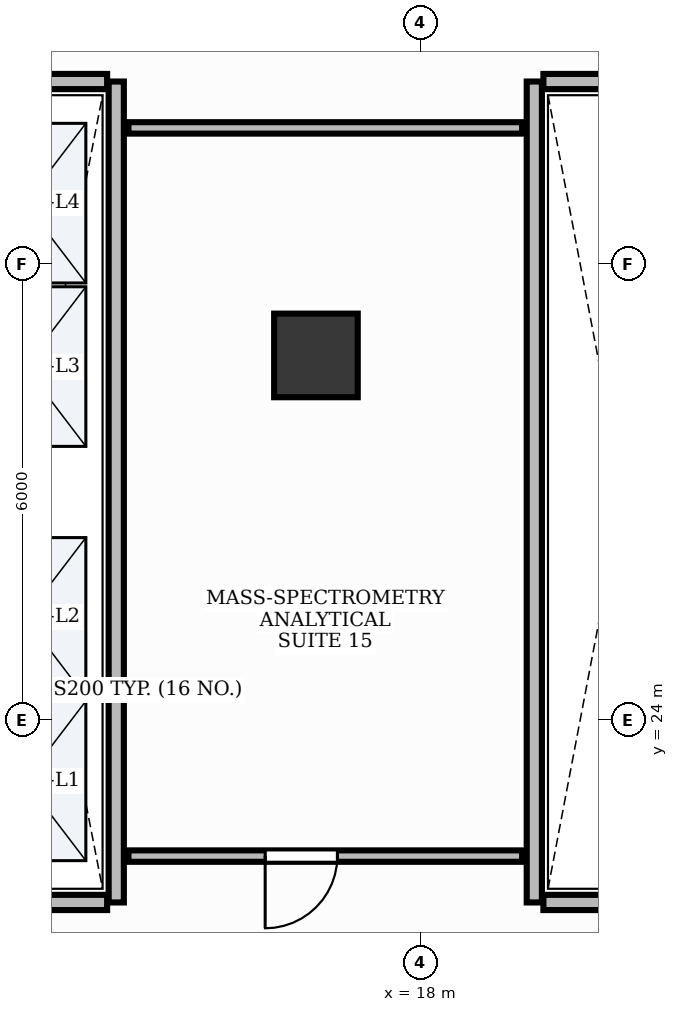
"""IFC4 building model, lengths in metres.
Left out: names, types, materials, properties, quantities, classifications, styles, units other than length and angle.
Written with IfcOpenShell. Run it as: python <this file> out.ifc"""

import sys

from ifc_helpers import new_model, si_unit, direction, frame, frame_2d, origin, origin_2d, place, context, subcontext, project, spatial, rectangle, extrude, element, fill, save


model = new_model("IFC4")
c1 = context("Model", 3, precision=1e-05, world=origin(), true_north=direction((0.0, 1.0)))
c2 = subcontext(c1, "Body", "Model", "MODEL_VIEW")
j1 = project(units=[si_unit("LENGTHUNIT", "METRE"), si_unit("PLANEANGLEUNIT", "RADIAN")], contexts=[c1])
p1 = place(None, origin())
s1 = spatial("IfcSite", under=j1, at=p1, CompositionType="ELEMENT")
p2 = place(p1, origin())
s2 = spatial("IfcBuilding", under=s1, at=p2, CompositionType="ELEMENT")
p3 = place(p2, frame((0.0, 0.0, 111.0)))
s3 = spatial("IfcBuildingStorey", under=s2, at=p3, CompositionType="ELEMENT", Elevation=111.0)
p4 = place(p3, frame((16.627, 28.797, -0.0), z_axis=(0.0, 0.0, 1.0), x_axis=(1.0, 0.0, 0.0)))
e1 = element("IfcColumn", 1, at=p4, inside=s3, PredefinedType="COLUMN", context=c2, shape_type="SweptSolid", body=[
    extrude(rectangle(XDim=1.1, YDim=1.1, at=origin_2d()), origin(), (0.0, 0.0, 1.0), 3.901),
])
p5 = place(p3, frame((14.0, 21.6, 0.0), z_axis=(0.0, 0.0, 1.0), x_axis=(0.0, 1.0, 0.0)))
e2 = element("IfcWall", 2, at=p5, inside=s3, PredefinedType="PARTITIONING", context=c2, shape_type="SweptSolid", body=[
    extrude(rectangle(XDim=10.8, YDim=0.2, at=frame_2d((5.4, 0.0))), origin(), (0.0, 0.0, 1.0), 2.91),
])
for number, where, z_axis, x_axis in (
    (3, (11.72, 21.6, 0.0), (0.0, 0.0, 1.0), (1.0, 0.0, 0.0)),
    (4, (11.72, 32.4, 0.0), (0.0, 0.0, 1.0), (1.0, 0.0, 0.0)),
):
    element("IfcWall", number, at=place(p3, frame(where, z_axis=z_axis, x_axis=x_axis)), inside=s3, PredefinedType="PARTITIONING", context=c2, shape_type="SweptSolid", body=[
        extrude(rectangle(XDim=2.16, YDim=0.2, at=frame_2d((1.08, 0.0))), origin(), (0.0, 0.0, 1.0), 2.91),
    ])
p6 = place(p3, frame((19.5, 21.6, 0.0), z_axis=(0.0, 0.0, 1.0), x_axis=(0.0, 1.0, 0.0)))
e5 = element("IfcWall", 5, at=p6, inside=s3, PredefinedType="PARTITIONING", context=c2, shape_type="SweptSolid", body=[
    extrude(rectangle(XDim=10.8, YDim=0.2, at=frame_2d((5.4, 0.0))), origin(), (0.0, 0.0, 1.0), 2.91),
])
for number, where, z_axis, x_axis in (
    (6, (19.62, 21.6, 0.0), (0.0, 0.0, 1.0), (1.0, 0.0, 0.0)),
    (7, (19.62, 32.4, 0.0), (0.0, 0.0, 1.0), (1.0, 0.0, 0.0)),
):
    element("IfcWall", number, at=place(p3, frame(where, z_axis=z_axis, x_axis=x_axis)), inside=s3, PredefinedType="PARTITIONING", context=c2, shape_type="SweptSolid", body=[
        extrude(rectangle(XDim=2.11, YDim=0.2, at=frame_2d((1.055, 0.0))), origin(), (0.0, 0.0, 1.0), 2.91),
    ])
p7 = place(p3, frame((19.34, 22.21, 0.0), z_axis=(0.0, 0.0, 1.0), x_axis=(-1.0, 0.0, 0.0)))
e8 = element("IfcWall", 8, at=p7, inside=s3, PredefinedType="PARTITIONING", context=c2, shape_type="SweptSolid", body=[
    extrude(rectangle(XDim=5.18, YDim=0.15, at=frame_2d((2.59, 0.0))), origin(), (0.0, 0.0, 1.0), 2.91),
])
p8 = place(p7, frame((2.431, 0.0, 0.0)))
e9 = element("IfcOpeningElement", 9, at=p8, cuts=e8, PredefinedType="OPENING", context=c2, shape_type="SweptSolid", body=[
    extrude(rectangle(XDim=0.95, YDim=2.15, at=frame_2d((0.475, 1.075))), frame((0.0, 0.09, 0.0), z_axis=(0.0, -1.0, 0.0), x_axis=(1.0, 0.0, 0.0)), (0.0, 0.0, 1.0), 0.18),
])
p9 = place(p3, frame((14.16, 31.79, 0.0), z_axis=(0.0, 0.0, 1.0), x_axis=(1.0, 0.0, 0.0)))
e10 = element("IfcWall", 10, at=p9, inside=s3, PredefinedType="PARTITIONING", context=c2, shape_type="SweptSolid", body=[
    extrude(rectangle(XDim=5.18, YDim=0.15, at=frame_2d((2.59, 0.0))), origin(), (0.0, 0.0, 1.0), 2.91),
])
p10 = place(p8, origin())
e11 = element("IfcDoor", 11, at=p10, inside=s3, OperationType="SINGLE_SWING_RIGHT", PredefinedType="DOOR", context=c2, shape_type="SweptSolid", body=[
    extrude(rectangle(XDim=0.95, YDim=2.15, at=frame_2d((0.475, 1.075))), frame((0.0, 0.025, 0.0), z_axis=(0.0, -1.0, 0.0), x_axis=(1.0, 0.0, 0.0)), (0.0, 0.0, 1.0), 0.05),
])
fill(e9, e11)
save(model, sys.argv[1])
